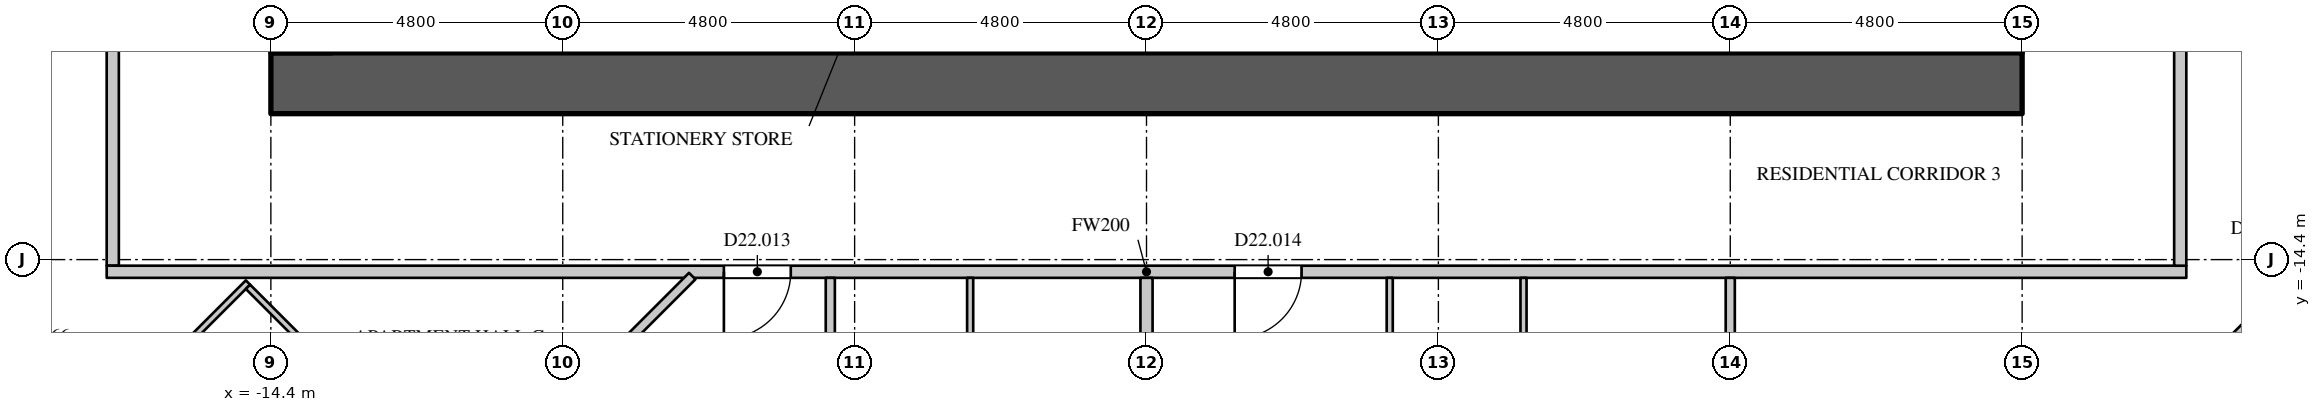
"""IFC4 building model, lengths in metres.
Left out: names, types, materials, properties, quantities, classifications, styles, units other than length and angle.
Written with IfcOpenShell. Run it as: python <this file> out.ifc"""

import sys

from ifc_helpers import new_model, si_unit, direction, frame, frame_2d, origin, place, context, subcontext, project, spatial, rectangle, extrude, element, fill, save


model = new_model("IFC4")
c1 = context("Model", 3, precision=1e-05, world=origin(), true_north=direction((0.0, 1.0)))
c2 = subcontext(c1, "Body", "Model", "MODEL_VIEW")
j1 = project(units=[si_unit("LENGTHUNIT", "METRE"), si_unit("PLANEANGLEUNIT", "RADIAN")], contexts=[c1])
p1 = place(None, origin())
s1 = spatial("IfcSite", under=j1, at=p1, CompositionType="ELEMENT")
p2 = place(p1, origin())
s2 = spatial("IfcBuilding", under=s1, at=p2, CompositionType="ELEMENT")
p3 = place(p2, frame((0.0, 0.0, 96.9)))
s3 = spatial("IfcBuildingStorey", under=s2, at=p3, CompositionType="ELEMENT", Elevation=96.9)
p4 = place(p3, frame((-14.4, -11.5, 0.0), z_axis=(0.0, 0.0, 1.0), x_axis=(1.0, 0.0, 0.0)))
e1 = element("IfcWall", 1, at=p4, inside=s3, PredefinedType="SHEAR", context=c2, shape_type="SweptSolid", body=[
    extrude(rectangle(XDim=28.8, YDim=1.0, at=frame_2d((14.4, 0.0))), origin(), (0.0, 0.0, 1.0), 4.2),
])
p5 = place(p3, frame((-17.0, -14.5, 0.0), z_axis=(0.0, 0.0, 1.0), x_axis=(0.0, 1.0, 0.0)))
e2 = element("IfcWall", 2, at=p5, inside=s3, PredefinedType="PARTITIONING", context=c2, shape_type="SweptSolid", body=[
    extrude(rectangle(XDim=29.0, YDim=0.2, at=frame_2d((14.5, 0.0))), origin(), (0.0, 0.0, 1.0), 3.798),
])
p6 = place(p5, frame((11.55, 0.0, 0.0)))
e3 = element("IfcOpeningElement", 3, at=p6, cuts=e2, PredefinedType="OPENING", context=c2, shape_type="SweptSolid", body=[
    extrude(rectangle(XDim=1.1, YDim=2.4, at=frame_2d((0.55, 1.2))), frame((0.0, 0.11, 0.0), z_axis=(0.0, -1.0, 0.0), x_axis=(1.0, 0.0, 0.0)), (0.0, 0.0, 1.0), 0.22),
])
p7 = place(p3, frame((-17.1, -14.6, 0.0), z_axis=(0.0, 0.0, 1.0), x_axis=(1.0, 0.0, 0.0)))
e4 = element("IfcWall", 4, at=p7, inside=s3, PredefinedType="PARTITIONING", context=c2, shape_type="SweptSolid", body=[
    extrude(rectangle(XDim=34.2, YDim=0.2, at=frame_2d((17.1, 0.0))), origin(), (0.0, 0.0, 1.0), 3.798),
])
p8 = place(p7, frame((10.15, 0.0, 0.0)))
e5 = element("IfcOpeningElement", 5, at=p8, cuts=e4, PredefinedType="OPENING", context=c2, shape_type="SweptSolid", body=[
    extrude(rectangle(XDim=1.1, YDim=2.4, at=frame_2d((0.55, 1.2))), frame((0.0, 0.11, 0.0), z_axis=(0.0, -1.0, 0.0), x_axis=(1.0, 0.0, 0.0)), (0.0, 0.0, 1.0), 0.22),
])
p9 = place(p7, frame((18.55, 0.0, 0.0)))
e6 = element("IfcOpeningElement", 6, at=p9, cuts=e4, PredefinedType="OPENING", context=c2, shape_type="SweptSolid", body=[
    extrude(rectangle(XDim=1.1, YDim=2.4, at=frame_2d((0.55, 1.2))), frame((0.0, 0.11, 0.0), z_axis=(0.0, -1.0, 0.0), x_axis=(1.0, 0.0, 0.0)), (0.0, 0.0, 1.0), 0.22),
])
p10 = place(p3, frame((17.0, -14.5, 0.0), z_axis=(0.0, 0.0, 1.0), x_axis=(0.0, 1.0, 0.0)))
e7 = element("IfcWall", 7, at=p10, inside=s3, PredefinedType="PARTITIONING", context=c2, shape_type="SweptSolid", body=[
    extrude(rectangle(XDim=29.0, YDim=0.2, at=frame_2d((14.5, 0.0))), origin(), (0.0, 0.0, 1.0), 3.798),
])
p11 = place(p10, frame((15.9, 0.0, 0.0)))
e8 = element("IfcOpeningElement", 8, at=p11, cuts=e7, PredefinedType="OPENING", context=c2, shape_type="SweptSolid", body=[
    extrude(rectangle(XDim=1.1, YDim=2.4, at=frame_2d((0.55, 1.2))), frame((0.0, 0.11, 0.0), z_axis=(0.0, -1.0, 0.0), x_axis=(1.0, 0.0, 0.0)), (0.0, 0.0, 1.0), 0.22),
])
p12 = place(p3, frame((-22.947, -12.051, 0.0), z_axis=(0.0, 0.0, 1.0), x_axis=(0.707106781187, -0.707106781187, 0.0)))
e9 = element("IfcWall", 9, at=p12, inside=s3, PredefinedType="PARTITIONING", context=c2, shape_type="SweptSolid", body=[
    extrude(rectangle(XDim=7.63, YDim=0.15, at=frame_2d((3.815, 0.0))), origin(), (0.0, 0.0, 1.0), 3.798),
])
p13 = place(p12, frame((4.65, 0.0, 0.0)))
e10 = element("IfcOpeningElement", 10, at=p13, cuts=e9, PredefinedType="OPENING", context=c2, shape_type="SweptSolid", body=[
    extrude(rectangle(XDim=0.95, YDim=2.2, at=frame_2d((0.475, 1.1))), frame((0.0, 0.085, 0.0), z_axis=(0.0, -1.0, 0.0), x_axis=(1.0, 0.0, 0.0)), (0.0, 0.0, 1.0), 0.17),
])
p14 = place(p3, frame((-9.547, -16.747, 0.0), z_axis=(0.0, 0.0, 1.0), x_axis=(0.707065207457, 0.707148352472, 0.0)))
e11 = element("IfcWall", 11, at=p14, inside=s3, PredefinedType="PARTITIONING", context=c2, shape_type="SweptSolid", body=[
    extrude(rectangle(XDim=2.936, YDim=0.15, at=frame_2d((1.468, 0.0))), origin(), (0.0, 0.0, 1.0), 3.798),
])
p15 = place(p3, frame((-5.2, -21.725, 0.0), z_axis=(0.0, 0.0, 1.0), x_axis=(0.0, 1.0, 0.0)))
e12 = element("IfcWall", 12, at=p15, inside=s3, PredefinedType="PARTITIONING", context=c2, shape_type="SweptSolid", body=[
    extrude(rectangle(XDim=7.025, YDim=0.15, at=frame_2d((3.513, 0.0))), origin(), (0.0, 0.0, 1.0), 3.798),
])
p16 = place(p15, frame((3.05, 0.0, 0.0)))
e13 = element("IfcOpeningElement", 13, at=p16, cuts=e12, PredefinedType="OPENING", context=c2, shape_type="SweptSolid", body=[
    extrude(rectangle(XDim=0.95, YDim=2.2, at=frame_2d((0.475, 1.1))), frame((0.0, 0.085, 0.0), z_axis=(0.0, -1.0, 0.0), x_axis=(1.0, 0.0, 0.0)), (0.0, 0.0, 1.0), 0.17),
])
p17 = place(p3, frame((9.6, -28.855, 0.0), z_axis=(0.0, 0.0, 1.0), x_axis=(0.0, 1.0, 0.0)))
e14 = element("IfcWall", 14, at=p17, inside=s3, PredefinedType="PARTITIONING", context=c2, shape_type="SweptSolid", body=[
    extrude(rectangle(XDim=14.155, YDim=0.15, at=frame_2d((7.078, 0.0))), origin(), (0.0, 0.0, 1.0), 3.798),
])
p18 = place(p17, frame((2.4, 0.0, 0.0)))
e15 = element("IfcOpeningElement", 15, at=p18, cuts=e14, PredefinedType="OPENING", context=c2, shape_type="SweptSolid", body=[
    extrude(rectangle(XDim=1.5, YDim=2.2, at=frame_2d((0.75, 1.1))), frame((0.0, 0.085, 0.0), z_axis=(0.0, -1.0, 0.0), x_axis=(1.0, 0.0, 0.0)), (0.0, 0.0, 1.0), 0.17),
])
p19 = place(p17, frame((10.2, 0.0, 0.0)))
e16 = element("IfcOpeningElement", 16, at=p19, cuts=e14, PredefinedType="OPENING", context=c2, shape_type="SweptSolid", body=[
    extrude(rectangle(XDim=0.95, YDim=2.2, at=frame_2d((0.475, 1.1))), frame((0.0, 0.085, 0.0), z_axis=(0.0, -1.0, 0.0), x_axis=(1.0, 0.0, 0.0)), (0.0, 0.0, 1.0), 0.17),
])
p20 = place(p3, frame((16.739, -16.845, 0.0), z_axis=(0.0, 0.0, 1.0), x_axis=(0.707130070773, 0.707083490833, 0.0)))
e17 = element("IfcWall", 17, at=p20, inside=s3, PredefinedType="PARTITIONING", context=c2, shape_type="SweptSolid", body=[
    extrude(rectangle(XDim=5.241, YDim=0.15, at=frame_2d((2.621, 0.0))), origin(), (0.0, 0.0, 1.0), 3.798),
])
p21 = place(p20, frame((3.3, 0.0, 0.0)))
e18 = element("IfcOpeningElement", 18, at=p21, cuts=e17, PredefinedType="OPENING", context=c2, shape_type="SweptSolid", body=[
    extrude(rectangle(XDim=0.95, YDim=2.2, at=frame_2d((0.475, 1.1))), frame((0.0, 0.085, 0.0), z_axis=(0.0, -1.0, 0.0), x_axis=(1.0, 0.0, 0.0)), (0.0, 0.0, 1.0), 0.17),
])
p22 = place(p3, frame((0.0, -28.855, 0.0), z_axis=(0.0, 0.0, 1.0), x_axis=(0.0, 1.0, 0.0)))
e19 = element("IfcWall", 19, at=p22, inside=s3, PredefinedType="PARTITIONING", context=c2, shape_type="SweptSolid", body=[
    extrude(rectangle(XDim=14.155, YDim=0.2, at=frame_2d((7.078, 0.0))), origin(), (0.0, 0.0, 1.0), 3.798),
])
p23 = place(p3, frame((-17.06, -17.06, 0.0), z_axis=(0.0, 0.0, 1.0), x_axis=(0.707106781187, 0.707106781187, 0.0)))
e20 = element("IfcWall", 20, at=p23, inside=s3, PredefinedType="PARTITIONING", context=c2, shape_type="SweptSolid", body=[
    extrude(rectangle(XDim=3.23, YDim=0.1, at=frame_2d((1.615, 0.0))), origin(), (0.0, 0.0, 1.0), 3.798),
])
p24 = place(p3, frame((-14.776, -14.847, 0.0), z_axis=(0.0, 0.0, 1.0), x_axis=(0.707106781187, -0.707106781187, 0.0)))
e21 = element("IfcWall", 21, at=p24, inside=s3, PredefinedType="PARTITIONING", context=c2, shape_type="SweptSolid", body=[
    extrude(rectangle(XDim=2.5, YDim=0.1, at=frame_2d((1.25, 0.0))), origin(), (0.0, 0.0, 1.0), 3.798),
])
p25 = place(p3, frame((-2.9, -21.725, 0.0), z_axis=(0.0, 0.0, 1.0), x_axis=(0.0, 1.0, 0.0)))
e22 = element("IfcWall", 22, at=p25, inside=s3, PredefinedType="PARTITIONING", context=c2, shape_type="SweptSolid", body=[
    extrude(rectangle(XDim=7.025, YDim=0.1, at=frame_2d((3.513, 0.0))), origin(), (0.0, 0.0, 1.0), 3.798),
])
p26 = place(p3, frame((4.0, -21.75, 0.0), z_axis=(0.0, 0.0, 1.0), x_axis=(0.0, 1.0, 0.0)))
e23 = element("IfcWall", 23, at=p26, inside=s3, PredefinedType="PARTITIONING", context=c2, shape_type="SweptSolid", body=[
    extrude(rectangle(XDim=7.05, YDim=0.1, at=frame_2d((3.525, 0.0))), origin(), (0.0, 0.0, 1.0), 3.798),
])
p27 = place(p26, frame((3.1, 0.0, 0.0)))
e24 = element("IfcOpeningElement", 24, at=p27, cuts=e23, PredefinedType="OPENING", context=c2, shape_type="SweptSolid", body=[
    extrude(rectangle(XDim=0.9, YDim=2.2, at=frame_2d((0.45, 1.1))), frame((0.0, 0.06, 0.0), z_axis=(0.0, -1.0, 0.0), x_axis=(1.0, 0.0, 0.0)), (0.0, 0.0, 1.0), 0.12),
])
p28 = place(p3, frame((6.2, -21.725, 0.0), z_axis=(0.0, 0.0, 1.0), x_axis=(0.0, 1.0, 0.0)))
e25 = element("IfcWall", 25, at=p28, inside=s3, PredefinedType="PARTITIONING", context=c2, shape_type="SweptSolid", body=[
    extrude(rectangle(XDim=7.025, YDim=0.1, at=frame_2d((3.513, 0.0))), origin(), (0.0, 0.0, 1.0), 3.798),
])
p29 = place(p8, origin())
e26 = element("IfcDoor", 26, at=p29, inside=s3, OperationType="SINGLE_SWING_RIGHT", PredefinedType="DOOR", context=c2, shape_type="SweptSolid", body=[
    extrude(rectangle(XDim=1.1, YDim=2.4, at=frame_2d((0.55, 1.2))), frame((0.0, 0.025, 0.0), z_axis=(0.0, -1.0, 0.0), x_axis=(1.0, 0.0, 0.0)), (0.0, 0.0, 1.0), 0.05),
])
fill(e5, e26)
p30 = place(p9, origin())
e27 = element("IfcDoor", 27, at=p30, inside=s3, OperationType="SINGLE_SWING_RIGHT", PredefinedType="DOOR", context=c2, shape_type="SweptSolid", body=[
    extrude(rectangle(XDim=1.1, YDim=2.4, at=frame_2d((0.55, 1.2))), frame((0.0, 0.025, 0.0), z_axis=(0.0, -1.0, 0.0), x_axis=(1.0, 0.0, 0.0)), (0.0, 0.0, 1.0), 0.05),
])
fill(e6, e27)
save(model, sys.argv[1])
